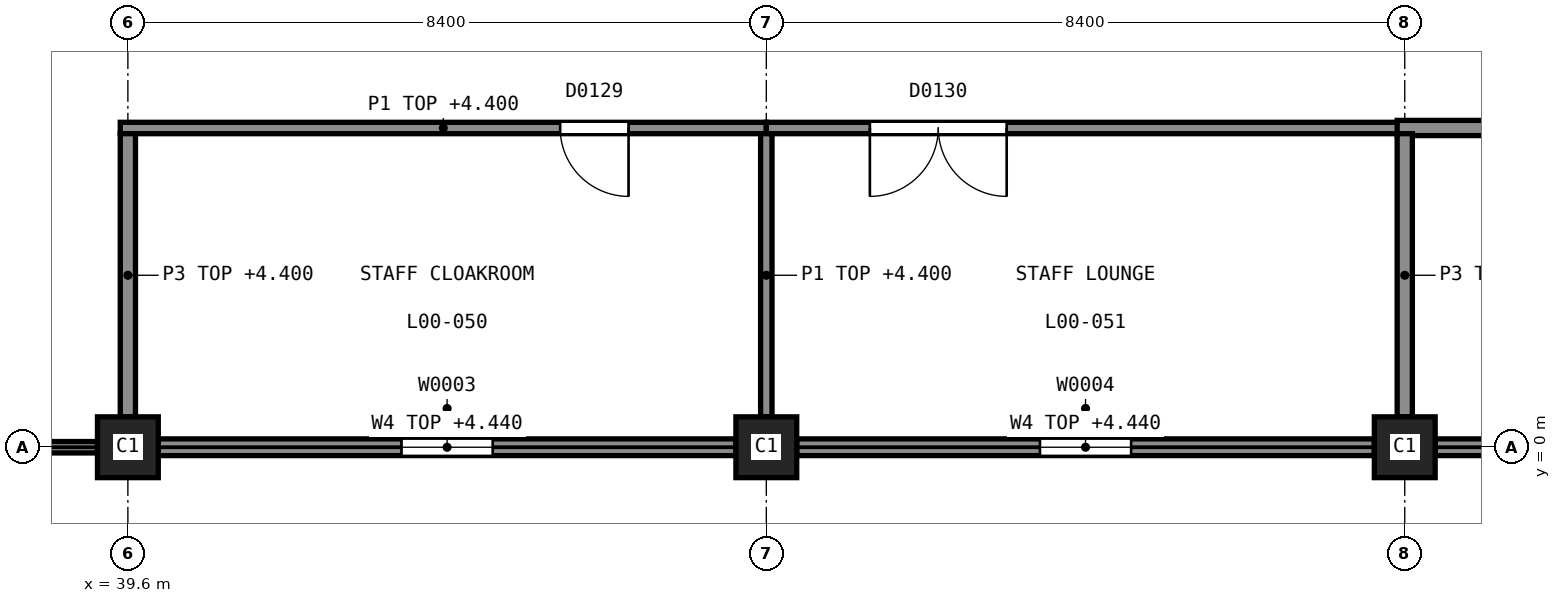
"""IFC4 building model, lengths in metres.
Left out: names, types, materials, properties, quantities, classifications, styles, units other than length and angle.
Written with IfcOpenShell. Run it as: python <this file> out.ifc"""

import sys

from ifc_helpers import new_model, si_unit, direction, frame, frame_2d, origin, origin_2d, place, context, subcontext, project, spatial, rectangle, extrude, element, fill, save


model = new_model("IFC4")
c1 = context("Model", 3, precision=1e-05, world=origin(), true_north=direction((0.0, 1.0)))
c2 = subcontext(c1, "Body", "Model", "MODEL_VIEW")
j1 = project(units=[si_unit("LENGTHUNIT", "METRE"), si_unit("PLANEANGLEUNIT", "RADIAN")], contexts=[c1])
p1 = place(None, origin())
s1 = spatial("IfcSite", under=j1, at=p1, CompositionType="ELEMENT")
p2 = place(p1, origin())
s2 = spatial("IfcBuilding", under=s1, at=p2, CompositionType="ELEMENT")
p3 = place(p2, origin())
s3 = spatial("IfcBuildingStorey", under=s2, at=p3, CompositionType="ELEMENT", Elevation=0.0)
for number, where, z_axis, x_axis in (
    (1, (39.6, 0.0, -0.3), (0.0, 0.0, 1.0), (1.0, 0.0, 0.0)),
    (2, (48.0, 0.0, -0.3), (0.0, 0.0, 1.0), (1.0, 0.0, 0.0)),
    (3, (56.4, 0.0, -0.3), (0.0, 0.0, 1.0), (1.0, 0.0, 0.0)),
):
    element("IfcColumn", number, at=place(p3, frame(where, z_axis=z_axis, x_axis=x_axis)), inside=s3, PredefinedType="COLUMN", context=c2, shape_type="SweptSolid", body=[
        extrude(rectangle(XDim=0.8, YDim=0.8, at=origin_2d()), origin(), (0.0, 0.0, 1.0), 5.8),
    ])
p4 = place(p3, frame((31.6, 0.0, 0.0), z_axis=(0.0, 0.0, 1.0), x_axis=(1.0, 0.0, 0.0)))
e4 = element("IfcWall", 4, at=p4, inside=s3, PredefinedType="ELEMENTEDWALL", context=c2, shape_type="SweptSolid", body=[
    extrude(rectangle(XDim=7.6, YDim=0.15, at=frame_2d((3.8, 0.0))), origin(), (0.0, 0.0, 1.0), 4.44),
])
p5 = place(p4, frame((2.9, 0.0, 0.0)))
e5 = element("IfcOpeningElement", 5, at=p5, cuts=e4, PredefinedType="OPENING", context=c2, shape_type="SweptSolid", body=[
    extrude(rectangle(XDim=1.8, YDim=2.1, at=frame_2d((0.9, 1.05))), frame((0.0, 0.085, 0.0), z_axis=(0.0, -1.0, 0.0), x_axis=(1.0, 0.0, 0.0)), (0.0, 0.0, 1.0), 0.17),
])
p6 = place(p3, frame((40.0, 0.0, 0.0), z_axis=(0.0, 0.0, 1.0), x_axis=(1.0, 0.0, 0.0)))
e6 = element("IfcWall", 6, at=p6, inside=s3, PredefinedType="SOLIDWALL", context=c2, shape_type="SweptSolid", body=[
    extrude(rectangle(XDim=7.6, YDim=0.22, at=frame_2d((3.8, 0.0))), origin(), (0.0, 0.0, 1.0), 4.44),
])
p7 = place(p6, frame((3.2, 0.0, 2.1)))
e7 = element("IfcOpeningElement", 7, at=p7, cuts=e6, PredefinedType="OPENING", context=c2, shape_type="SweptSolid", body=[
    extrude(rectangle(XDim=1.2, YDim=0.6, at=frame_2d((0.6, 0.3))), frame((0.0, 0.12, 0.0), z_axis=(0.0, -1.0, 0.0), x_axis=(1.0, 0.0, 0.0)), (0.0, 0.0, 1.0), 0.24),
])
p8 = place(p3, frame((48.4, 0.0, 0.0), z_axis=(0.0, 0.0, 1.0), x_axis=(1.0, 0.0, 0.0)))
e8 = element("IfcWall", 8, at=p8, inside=s3, PredefinedType="SOLIDWALL", context=c2, shape_type="SweptSolid", body=[
    extrude(rectangle(XDim=7.6, YDim=0.22, at=frame_2d((3.8, 0.0))), origin(), (0.0, 0.0, 1.0), 4.44),
])
p9 = place(p8, frame((3.2, 0.0, 2.1)))
e9 = element("IfcOpeningElement", 9, at=p9, cuts=e8, PredefinedType="OPENING", context=c2, shape_type="SweptSolid", body=[
    extrude(rectangle(XDim=1.2, YDim=0.6, at=frame_2d((0.6, 0.3))), frame((0.0, 0.12, 0.0), z_axis=(0.0, -1.0, 0.0), x_axis=(1.0, 0.0, 0.0)), (0.0, 0.0, 1.0), 0.24),
])
p10 = place(p3, frame((56.8, 0.0, 0.0), z_axis=(0.0, 0.0, 1.0), x_axis=(1.0, 0.0, 0.0)))
e10 = element("IfcWall", 10, at=p10, inside=s3, PredefinedType="SOLIDWALL", context=c2, shape_type="SweptSolid", body=[
    extrude(rectangle(XDim=7.6, YDim=0.22, at=frame_2d((3.8, 0.0))), origin(), (0.0, 0.0, 1.0), 4.44),
])
p11 = place(p10, frame((3.2, 0.0, 2.1)))
e11 = element("IfcOpeningElement", 11, at=p11, cuts=e10, PredefinedType="OPENING", context=c2, shape_type="SweptSolid", body=[
    extrude(rectangle(XDim=1.2, YDim=0.6, at=frame_2d((0.6, 0.3))), frame((0.0, 0.12, 0.0), z_axis=(0.0, -1.0, 0.0), x_axis=(1.0, 0.0, 0.0)), (0.0, 0.0, 1.0), 0.24),
])
p12 = place(p3, frame((39.5, 4.2, 0.0), z_axis=(0.0, 0.0, 1.0), x_axis=(1.0, 0.0, 0.0)))
e12 = element("IfcWall", 12, at=p12, inside=s3, PredefinedType="PARTITIONING", context=c2, shape_type="SweptSolid", body=[
    extrude(rectangle(XDim=8.5, YDim=0.15, at=frame_2d((4.25, 0.0))), origin(), (0.0, 0.0, 1.0), 4.4),
])
p13 = place(p12, frame((5.788, 0.0, 0.0)))
e13 = element("IfcOpeningElement", 13, at=p13, cuts=e12, PredefinedType="OPENING", context=c2, shape_type="SweptSolid", body=[
    extrude(rectangle(XDim=0.9, YDim=2.1, at=frame_2d((0.45, 1.05))), frame((0.0, 0.085, 0.0), z_axis=(0.0, -1.0, 0.0), x_axis=(1.0, 0.0, 0.0)), (0.0, 0.0, 1.0), 0.17),
])
p14 = place(p3, frame((48.0, 4.2, 0.0), z_axis=(0.0, 0.0, 1.0), x_axis=(1.0, 0.0, 0.0)))
e14 = element("IfcWall", 14, at=p14, inside=s3, PredefinedType="PARTITIONING", context=c2, shape_type="SweptSolid", body=[
    extrude(rectangle(XDim=8.5, YDim=0.15, at=frame_2d((4.25, 0.0))), origin(), (0.0, 0.0, 1.0), 4.4),
])
p15 = place(p14, frame((1.363, 0.0, 0.0)))
e15 = element("IfcOpeningElement", 15, at=p15, cuts=e14, PredefinedType="OPENING", context=c2, shape_type="SweptSolid", body=[
    extrude(rectangle(XDim=1.8, YDim=2.1, at=frame_2d((0.9, 1.05))), frame((0.0, 0.085, 0.0), z_axis=(0.0, -1.0, 0.0), x_axis=(1.0, 0.0, 0.0)), (0.0, 0.0, 1.0), 0.17),
])
p16 = place(p3, frame((56.3, 4.2, 0.0), z_axis=(0.0, 0.0, 1.0), x_axis=(1.0, 0.0, 0.0)))
e16 = element("IfcWall", 16, at=p16, inside=s3, PredefinedType="PARTITIONING", context=c2, shape_type="SweptSolid", body=[
    extrude(rectangle(XDim=8.5, YDim=0.2, at=frame_2d((4.25, 0.0))), origin(), (0.0, 0.0, 1.0), 4.4),
])
p17 = place(p16, frame((1.875, 0.0, 0.0)))
e17 = element("IfcOpeningElement", 17, at=p17, cuts=e16, PredefinedType="OPENING", context=c2, shape_type="SweptSolid", body=[
    extrude(rectangle(XDim=1.0, YDim=2.1, at=frame_2d((0.5, 1.05))), frame((0.0, 0.11, 0.0), z_axis=(0.0, -1.0, 0.0), x_axis=(1.0, 0.0, 0.0)), (0.0, 0.0, 1.0), 0.22),
])
p18 = place(p3, frame((39.6, 0.4, 0.0), z_axis=(0.0, 0.0, 1.0), x_axis=(0.0, 1.0, 0.0)))
e18 = element("IfcWall", 18, at=p18, inside=s3, PredefinedType="PARTITIONING", context=c2, shape_type="SweptSolid", body=[
    extrude(rectangle(XDim=3.725, YDim=0.2, at=frame_2d((1.863, 0.0))), origin(), (0.0, 0.0, 1.0), 4.4),
])
p19 = place(p3, frame((48.0, 0.4, 0.0), z_axis=(0.0, 0.0, 1.0), x_axis=(0.0, 1.0, 0.0)))
e19 = element("IfcWall", 19, at=p19, inside=s3, PredefinedType="PARTITIONING", context=c2, shape_type="SweptSolid", body=[
    extrude(rectangle(XDim=3.725, YDim=0.15, at=frame_2d((1.863, 0.0))), origin(), (0.0, 0.0, 1.0), 4.4),
])
p20 = place(p3, frame((56.4, 0.4, 0.0), z_axis=(0.0, 0.0, 1.0), x_axis=(0.0, 1.0, 0.0)))
e20 = element("IfcWall", 20, at=p20, inside=s3, PredefinedType="PARTITIONING", context=c2, shape_type="SweptSolid", body=[
    extrude(rectangle(XDim=3.725, YDim=0.2, at=frame_2d((1.863, 0.0))), origin(), (0.0, 0.0, 1.0), 4.4),
])
p21 = place(p7, origin())
e21 = element("IfcWindow", 21, at=p21, inside=s3, PartitioningType="SINGLE_PANEL", PredefinedType="WINDOW", context=c2, shape_type="SweptSolid", body=[
    extrude(rectangle(XDim=1.2, YDim=0.6, at=frame_2d((0.6, 0.3))), frame((0.0, 0.09, 0.0), z_axis=(0.0, -1.0, 0.0), x_axis=(1.0, 0.0, 0.0)), (0.0, 0.0, 1.0), 0.06),
])
fill(e7, e21)
p22 = place(p9, origin())
e22 = element("IfcWindow", 22, at=p22, inside=s3, PartitioningType="SINGLE_PANEL", PredefinedType="WINDOW", context=c2, shape_type="SweptSolid", body=[
    extrude(rectangle(XDim=1.2, YDim=0.6, at=frame_2d((0.6, 0.3))), frame((0.0, 0.09, 0.0), z_axis=(0.0, -1.0, 0.0), x_axis=(1.0, 0.0, 0.0)), (0.0, 0.0, 1.0), 0.06),
])
fill(e9, e22)
p23 = place(p13, origin())
e23 = element("IfcDoor", 23, at=p23, inside=s3, OperationType="SINGLE_SWING_RIGHT", PredefinedType="DOOR", context=c2, shape_type="SweptSolid", body=[
    extrude(rectangle(XDim=0.9, YDim=2.1, at=frame_2d((0.45, 1.05))), frame((0.0, 0.025, 0.0), z_axis=(0.0, -1.0, 0.0), x_axis=(1.0, 0.0, 0.0)), (0.0, 0.0, 1.0), 0.05),
])
fill(e13, e23)
p24 = place(p15, origin())
e24 = element("IfcDoor", 24, at=p24, inside=s3, OperationType="DOUBLE_DOOR_SINGLE_SWING", PredefinedType="DOOR", context=c2, shape_type="SweptSolid", body=[
    extrude(rectangle(XDim=1.8, YDim=2.1, at=frame_2d((0.9, 1.05))), frame((0.0, 0.025, 0.0), z_axis=(0.0, -1.0, 0.0), x_axis=(1.0, 0.0, 0.0)), (0.0, 0.0, 1.0), 0.05),
])
fill(e15, e24)
save(model, sys.argv[1])
